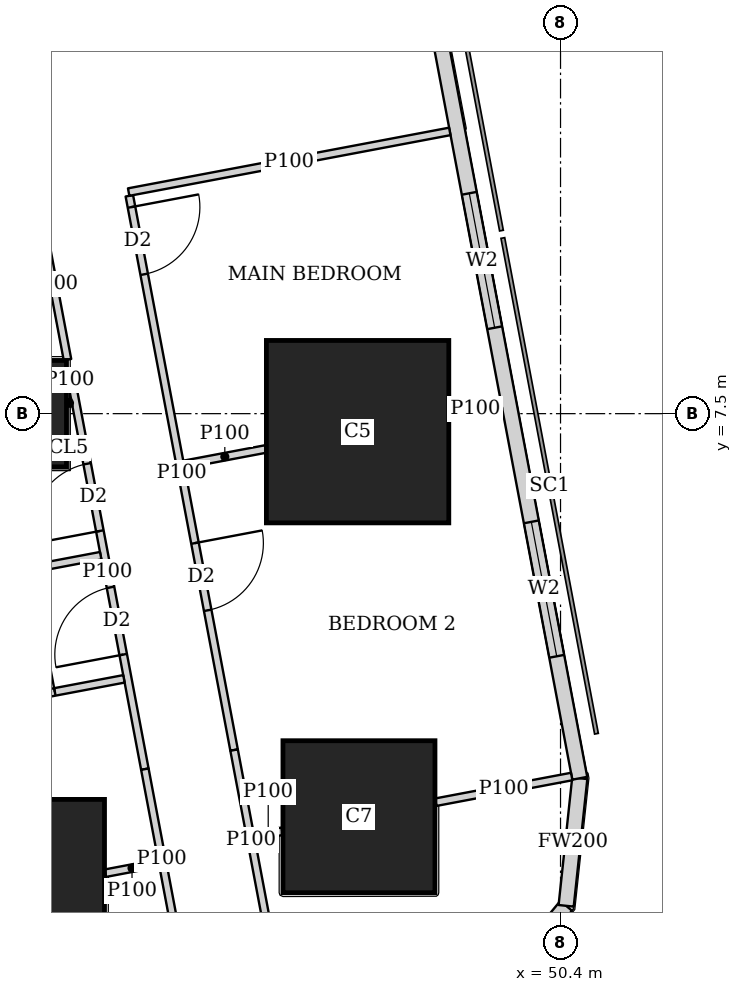
"""IFC4 building model, lengths in metres.
Left out: names, types, materials, properties, quantities, classifications, styles, units other than length and angle.
Written with IfcOpenShell. Run it as: python <this file> out.ifc"""

import sys

from ifc_helpers import new_model, si_unit, direction, frame, frame_2d, origin, origin_2d, place, context, subcontext, project, spatial, rectangle, extrude, element, fill, save


model = new_model("IFC4")
c1 = context("Model", 3, precision=1e-05, world=origin(), true_north=direction((0.0, 1.0)))
c2 = subcontext(c1, "Body", "Model", "MODEL_VIEW")
j1 = project(units=[si_unit("LENGTHUNIT", "METRE"), si_unit("PLANEANGLEUNIT", "RADIAN")], contexts=[c1])
p1 = place(None, origin())
s1 = spatial("IfcSite", under=j1, at=p1, CompositionType="ELEMENT")
p2 = place(p1, origin())
s2 = spatial("IfcBuilding", under=s1, at=p2, CompositionType="ELEMENT")
p3 = place(p2, frame((0.0, 0.0, 208.7)))
s3 = spatial("IfcBuildingStorey", under=s2, at=p3, CompositionType="ELEMENT", Elevation=208.7)
p4 = place(p3, frame((43.2, 1.225, 0.0), z_axis=(0.0, 0.0, 1.0), x_axis=(1.0, 0.0, 0.0)))
e1 = element("IfcColumn", 1, at=p4, inside=s3, PredefinedType="COLUMN", context=c2, shape_type="SweptSolid", body=[
    extrude(rectangle(XDim=2.4, YDim=2.4, at=origin_2d()), origin(), (0.0, 0.0, 1.0), 3.75),
])
p5 = place(p3, frame((47.748, 2.197, 0.0), z_axis=(0.0, 0.0, 1.0), x_axis=(1.0, 0.0, 0.0)))
e2 = element("IfcColumn", 2, at=p5, inside=s3, PredefinedType="COLUMN", context=c2, shape_type="SweptSolid", body=[
    extrude(rectangle(XDim=2.0, YDim=2.0, at=origin_2d()), origin(), (0.0, 0.0, 1.0), 3.75),
])
p6 = place(p3, frame((43.2, 7.5, 0.0), z_axis=(0.0, 0.0, 1.0), x_axis=(1.0, 0.0, 0.0)))
e3 = element("IfcColumn", 3, at=p6, inside=s3, PredefinedType="COLUMN", context=c2, shape_type="SweptSolid", body=[
    extrude(rectangle(XDim=1.4, YDim=1.4, at=origin_2d()), origin(), (0.0, 0.0, 1.0), 3.75),
])
p7 = place(p3, frame((47.73, 7.263, 0.0), z_axis=(0.0, 0.0, 1.0), x_axis=(1.0, 0.0, 0.0)))
e4 = element("IfcColumn", 4, at=p7, inside=s3, PredefinedType="COLUMN", context=c2, shape_type="SweptSolid", body=[
    extrude(rectangle(XDim=2.4, YDim=2.4, at=origin_2d()), origin(), (0.0, 0.0, 1.0), 3.75),
])
p8 = place(p3, frame((49.407, -0.263, 0.0), z_axis=(0.0, 0.0, 1.0), x_axis=(0.638042593423, 0.770001070764, 0.0)))
e5 = element("IfcWall", 5, at=p8, inside=s3, PredefinedType="SOLIDWALL", context=c2, shape_type="SweptSolid", body=[
    extrude(rectangle(XDim=1.673, YDim=0.2, at=frame_2d((0.836, 0.0))), origin(), (0.0, 0.0, 1.0), 3.5),
])
p9 = place(p3, frame((50.474, 1.025, 0.0), z_axis=(0.0, 0.0, 1.0), x_axis=(0.106047815515, 0.994361031429, 0.0)))
e6 = element("IfcWall", 6, at=p9, inside=s3, PredefinedType="SOLIDWALL", context=c2, shape_type="SweptSolid", body=[
    extrude(rectangle(XDim=1.688, YDim=0.2, at=frame_2d((0.844, 0.0))), origin(), (0.0, 0.0, 1.0), 3.5),
])
p10 = place(p3, frame((50.653, 2.703, 0.0), z_axis=(0.0, 0.0, 1.0), x_axis=(-0.185612026696, 0.982623109613, 0.0)))
e7 = element("IfcWall", 7, at=p10, inside=s3, PredefinedType="SOLIDWALL", context=c2, shape_type="SweptSolid", body=[
    extrude(rectangle(XDim=41.393, YDim=0.2, at=frame_2d((20.697, 0.0))), origin(), (0.0, 0.0, 1.0), 3.5),
])
p11 = place(p10, frame((1.633, 0.0, 0.9)))
e8 = element("IfcOpeningElement", 8, at=p11, cuts=e7, PredefinedType="OPENING", context=c2, shape_type="SweptSolid", body=[
    extrude(rectangle(XDim=1.8, YDim=1.5, at=frame_2d((0.9, 0.75))), frame((0.0, 0.11, 0.0), z_axis=(0.0, -1.0, 0.0), x_axis=(1.0, 0.0, 0.0)), (0.0, 0.0, 1.0), 0.22),
])
p12 = place(p10, frame((6.032, 0.0, 0.9)))
e9 = element("IfcOpeningElement", 9, at=p12, cuts=e7, PredefinedType="OPENING", context=c2, shape_type="SweptSolid", body=[
    extrude(rectangle(XDim=1.8, YDim=1.5, at=frame_2d((0.9, 0.75))), frame((0.0, 0.11, 0.0), z_axis=(0.0, -1.0, 0.0), x_axis=(1.0, 0.0, 0.0)), (0.0, 0.0, 1.0), 0.22),
])
p13 = place(p10, frame((9.848, 0.0, 0.9)))
e10 = element("IfcOpeningElement", 10, at=p13, cuts=e7, PredefinedType="OPENING", context=c2, shape_type="SweptSolid", body=[
    extrude(rectangle(XDim=1.8, YDim=1.5, at=frame_2d((0.9, 0.75))), frame((0.0, 0.11, 0.0), z_axis=(0.0, -1.0, 0.0), x_axis=(1.0, 0.0, 0.0)), (0.0, 0.0, 1.0), 0.22),
])
p14 = place(p10, frame((13.664, 0.0, 0.9)))
e11 = element("IfcOpeningElement", 11, at=p14, cuts=e7, PredefinedType="OPENING", context=c2, shape_type="SweptSolid", body=[
    extrude(rectangle(XDim=1.8, YDim=1.5, at=frame_2d((0.9, 0.75))), frame((0.0, 0.11, 0.0), z_axis=(0.0, -1.0, 0.0), x_axis=(1.0, 0.0, 0.0)), (0.0, 0.0, 1.0), 0.22),
])
p15 = place(p10, frame((17.481, 0.0, 0.9)))
e12 = element("IfcOpeningElement", 12, at=p15, cuts=e7, PredefinedType="OPENING", context=c2, shape_type="SweptSolid", body=[
    extrude(rectangle(XDim=1.8, YDim=1.5, at=frame_2d((0.9, 0.75))), frame((0.0, 0.11, 0.0), z_axis=(0.0, -1.0, 0.0), x_axis=(1.0, 0.0, 0.0)), (0.0, 0.0, 1.0), 0.22),
])
p16 = place(p10, frame((21.297, 0.0, 0.9)))
e13 = element("IfcOpeningElement", 13, at=p16, cuts=e7, PredefinedType="OPENING", context=c2, shape_type="SweptSolid", body=[
    extrude(rectangle(XDim=1.8, YDim=1.5, at=frame_2d((0.9, 0.75))), frame((0.0, 0.11, 0.0), z_axis=(0.0, -1.0, 0.0), x_axis=(1.0, 0.0, 0.0)), (0.0, 0.0, 1.0), 0.22),
])
p17 = place(p10, frame((25.113, 0.0, 0.9)))
e14 = element("IfcOpeningElement", 14, at=p17, cuts=e7, PredefinedType="OPENING", context=c2, shape_type="SweptSolid", body=[
    extrude(rectangle(XDim=1.8, YDim=1.5, at=frame_2d((0.9, 0.75))), frame((0.0, 0.11, 0.0), z_axis=(0.0, -1.0, 0.0), x_axis=(1.0, 0.0, 0.0)), (0.0, 0.0, 1.0), 0.22),
])
p18 = place(p10, frame((28.93, 0.0, 0.9)))
e15 = element("IfcOpeningElement", 15, at=p18, cuts=e7, PredefinedType="OPENING", context=c2, shape_type="SweptSolid", body=[
    extrude(rectangle(XDim=1.8, YDim=1.5, at=frame_2d((0.9, 0.75))), frame((0.0, 0.11, 0.0), z_axis=(0.0, -1.0, 0.0), x_axis=(1.0, 0.0, 0.0)), (0.0, 0.0, 1.0), 0.22),
])
p19 = place(p10, frame((32.746, 0.0, 0.9)))
e16 = element("IfcOpeningElement", 16, at=p19, cuts=e7, PredefinedType="OPENING", context=c2, shape_type="SweptSolid", body=[
    extrude(rectangle(XDim=1.8, YDim=1.5, at=frame_2d((0.9, 0.75))), frame((0.0, 0.11, 0.0), z_axis=(0.0, -1.0, 0.0), x_axis=(1.0, 0.0, 0.0)), (0.0, 0.0, 1.0), 0.22),
])
p20 = place(p10, frame((36.481, 0.0, 0.9)))
e17 = element("IfcOpeningElement", 17, at=p20, cuts=e7, PredefinedType="OPENING", context=c2, shape_type="SweptSolid", body=[
    extrude(rectangle(XDim=1.8, YDim=1.5, at=frame_2d((0.9, 0.75))), frame((0.0, 0.11, 0.0), z_axis=(0.0, -1.0, 0.0), x_axis=(1.0, 0.0, 0.0)), (0.0, 0.0, 1.0), 0.22),
])
p21 = place(p3, frame((44.727, 10.366, 0.0), z_axis=(0.0, 0.0, 1.0), x_axis=(0.185678775129, -0.982610498858, 0.0)))
e18 = element("IfcWall", 18, at=p21, inside=s3, PredefinedType="PARTITIONING", context=c2, shape_type="SweptSolid", body=[
    extrude(rectangle(XDim=7.421, YDim=0.1, at=frame_2d((3.71, 0.0))), origin(), (0.0, 0.0, 1.0), 3.5),
])
p22 = place(p21, frame((0.151, 0.0, 0.0)))
e19 = element("IfcOpeningElement", 19, at=p22, cuts=e18, PredefinedType="OPENING", context=c2, shape_type="SweptSolid", body=[
    extrude(rectangle(XDim=0.9, YDim=2.1, at=frame_2d((0.45, 1.05))), frame((0.0, 0.06, 0.0), z_axis=(0.0, -1.0, 0.0), x_axis=(1.0, 0.0, 0.0)), (0.0, 0.0, 1.0), 0.12),
])
p23 = place(p21, frame((4.65, 0.0, 0.0)))
e20 = element("IfcOpeningElement", 20, at=p23, cuts=e18, PredefinedType="OPENING", context=c2, shape_type="SweptSolid", body=[
    extrude(rectangle(XDim=0.9, YDim=2.1, at=frame_2d((0.45, 1.05))), frame((0.0, 0.06, 0.0), z_axis=(0.0, -1.0, 0.0), x_axis=(1.0, 0.0, 0.0)), (0.0, 0.0, 1.0), 0.12),
])
p24 = place(p3, frame((46.105, 3.074, 0.0), z_axis=(0.0, 0.0, 1.0), x_axis=(0.185631845838, -0.982619365681, 0.0)))
e21 = element("IfcWall", 21, at=p24, inside=s3, PredefinedType="PARTITIONING", context=c2, shape_type="SweptSolid", body=[
    extrude(rectangle(XDim=2.403, YDim=0.1, at=frame_2d((1.201, 0.0))), origin(), (0.0, 0.0, 1.0), 2.05),
])
p25 = place(p3, frame((43.539, 10.192, 0.0), z_axis=(0.0, 0.0, 1.0), x_axis=(0.185443145218, -0.982654995353, 0.0)))
e22 = element("IfcWall", 22, at=p25, inside=s3, PredefinedType="PARTITIONING", context=c2, shape_type="SweptSolid", body=[
    extrude(rectangle(XDim=2.017, YDim=0.1, at=frame_2d((1.008, 0.0))), origin(), (0.0, 0.0, 1.0), 3.5),
])
p26 = place(p3, frame((43.949, 8.02, 0.0), z_axis=(0.0, 0.0, 1.0), x_axis=(0.185656792073, -0.982614652627, 0.0)))
e23 = element("IfcWall", 23, at=p26, inside=s3, PredefinedType="PARTITIONING", context=c2, shape_type="SweptSolid", body=[
    extrude(rectangle(XDim=5.289, YDim=0.1, at=frame_2d((2.645, 0.0))), origin(), (0.0, 0.0, 1.0), 3.5),
])
p27 = place(p26, frame((1.2, 0.0, 0.0)))
e24 = element("IfcOpeningElement", 24, at=p27, cuts=e23, PredefinedType="OPENING", context=c2, shape_type="SweptSolid", body=[
    extrude(rectangle(XDim=0.9, YDim=2.1, at=frame_2d((0.45, 1.05))), frame((0.0, 0.06, 0.0), z_axis=(0.0, -1.0, 0.0), x_axis=(1.0, 0.0, 0.0)), (0.0, 0.0, 1.0), 0.12),
])
p28 = place(p26, frame((2.855, 0.0, 0.0)))
e25 = element("IfcOpeningElement", 25, at=p28, cuts=e23, PredefinedType="OPENING", context=c2, shape_type="SweptSolid", body=[
    extrude(rectangle(XDim=0.9, YDim=2.1, at=frame_2d((0.45, 1.05))), frame((0.0, 0.06, 0.0), z_axis=(0.0, -1.0, 0.0), x_axis=(1.0, 0.0, 0.0)), (0.0, 0.0, 1.0), 0.12),
])
p29 = place(p3, frame((44.931, 2.823, 0.0), z_axis=(0.0, 0.0, 1.0), x_axis=(0.185631845838, -0.982619365681, 0.0)))
e26 = element("IfcWall", 26, at=p29, inside=s3, PredefinedType="PARTITIONING", context=c2, shape_type="SweptSolid", body=[
    extrude(rectangle(XDim=2.403, YDim=0.1, at=frame_2d((1.201, 0.0))), origin(), (0.0, 0.0, 1.0), 2.05),
])
p30 = place(p3, frame((48.943, 11.213, 0.0), z_axis=(0.0, 0.0, 1.0), x_axis=(-0.982633535512, -0.185556823879, 0.0)))
e27 = element("IfcWall", 27, at=p30, inside=s3, PredefinedType="PARTITIONING", context=c2, shape_type="SweptSolid", body=[
    extrude(rectangle(XDim=4.3, YDim=0.1, at=frame_2d((2.15, 0.0))), origin(), (0.0, 0.0, 1.0), 2.05),
])
p31 = place(p3, frame((49.622, 7.62, 0.0), z_axis=(0.0, 0.0, 1.0), x_axis=(-0.98254419619, -0.186029305578, 0.0)))
e28 = element("IfcWall", 28, at=p31, inside=s3, PredefinedType="PARTITIONING", context=c2, shape_type="SweptSolid", body=[
    extrude(rectangle(XDim=0.694, YDim=0.1, at=frame_2d((0.347, 0.0))), origin(), (0.0, 0.0, 1.0), 3.5),
])
p32 = place(p3, frame((46.52, 7.035, 0.0), z_axis=(0.0, 0.0, 1.0), x_axis=(-0.982620932907, -0.185623549726, 0.0)))
e29 = element("IfcWall", 29, at=p32, inside=s3, PredefinedType="PARTITIONING", context=c2, shape_type="SweptSolid", body=[
    extrude(rectangle(XDim=1.093, YDim=0.1, at=frame_2d((0.546, 0.0))), origin(), (0.0, 0.0, 1.0), 3.5),
])
p33 = place(p3, frame((50.547, 2.726, 0.0), z_axis=(0.0, 0.0, 1.0), x_axis=(-0.982603988143, -0.185713226471, 0.0)))
e30 = element("IfcWall", 30, at=p33, inside=s3, PredefinedType="PARTITIONING", context=c2, shape_type="SweptSolid", body=[
    extrude(rectangle(XDim=1.821, YDim=0.1, at=frame_2d((0.91, 0.0))), origin(), (0.0, 0.0, 1.0), 2.05),
])
p34 = place(p3, frame((46.738, 2.006, 0.0), z_axis=(0.0, 0.0, 1.0), x_axis=(-0.982820466874, -0.184564161994, 0.0)))
e31 = element("IfcWall", 31, at=p34, inside=s3, PredefinedType="PARTITIONING", context=c2, shape_type="SweptSolid", body=[
    extrude(rectangle(XDim=0.374, YDim=0.1, at=frame_2d((0.187, 0.0))), origin(), (0.0, 0.0, 1.0), 2.05),
])
p35 = place(p3, frame((43.969, 7.646, 0.0), z_axis=(0.0, 0.0, 1.0), x_axis=(-0.983147034646, -0.182816597351, 0.0)))
e32 = element("IfcWall", 32, at=p35, inside=s3, PredefinedType="PARTITIONING", context=c2, shape_type="SweptSolid", body=[
    extrude(rectangle(XDim=0.06, YDim=0.1, at=frame_2d((0.03, 0.0))), origin(), (0.0, 0.0, 1.0), 3.5),
])
p36 = place(p3, frame((45.114, 1.587, 0.0), z_axis=(0.0, 0.0, 1.0), x_axis=(-0.982671022916, -0.185358195723, 0.0)))
e33 = element("IfcWall", 33, at=p36, inside=s3, PredefinedType="PARTITIONING", context=c2, shape_type="SweptSolid", body=[
    extrude(rectangle(XDim=0.717, YDim=0.1, at=frame_2d((0.358, 0.0))), origin(), (0.0, 0.0, 1.0), 2.05),
])
p37 = place(p3, frame((44.35, 5.631, 0.0), z_axis=(0.0, 0.0, 1.0), x_axis=(-0.982638553676, -0.185530247748, 0.0)))
e34 = element("IfcWall", 34, at=p37, inside=s3, PredefinedType="PARTITIONING", context=c2, shape_type="SweptSolid", body=[
    extrude(rectangle(XDim=3.525, YDim=0.1, at=frame_2d((1.763, 0.0))), origin(), (0.0, 0.0, 1.0), 3.5),
])
p38 = place(p3, frame((41.192, 3.356, 0.0), z_axis=(0.0, 0.0, 1.0), x_axis=(0.982588017646, 0.185797706064, 0.0)))
e35 = element("IfcWall", 35, at=p38, inside=s3, PredefinedType="PARTITIONING", context=c2, shape_type="SweptSolid", body=[
    extrude(rectangle(XDim=3.525, YDim=0.1, at=frame_2d((1.763, 0.0))), origin(), (0.0, 0.0, 1.0), 3.5),
])
p39 = place(p38, frame((1.7, 0.0, 0.0)))
e36 = element("IfcOpeningElement", 36, at=p39, cuts=e35, PredefinedType="OPENING", context=c2, shape_type="SweptSolid", body=[
    extrude(rectangle(XDim=0.9, YDim=2.1, at=frame_2d((0.45, 1.05))), frame((0.0, 0.06, 0.0), z_axis=(0.0, -1.0, 0.0), x_axis=(1.0, 0.0, 0.0)), (0.0, 0.0, 1.0), 0.12),
])
p40 = place(p11, origin())
e37 = element("IfcWindow", 37, at=p40, inside=s3, PartitioningType="SINGLE_PANEL", PredefinedType="WINDOW", context=c2, shape_type="SweptSolid", body=[
    extrude(rectangle(XDim=1.8, YDim=1.5, at=frame_2d((0.9, 0.75))), frame((0.0, 0.03, 0.0), z_axis=(0.0, -1.0, 0.0), x_axis=(1.0, 0.0, 0.0)), (0.0, 0.0, 1.0), 0.06),
])
fill(e8, e37)
p41 = place(p12, origin())
e38 = element("IfcWindow", 38, at=p41, inside=s3, PartitioningType="SINGLE_PANEL", PredefinedType="WINDOW", context=c2, shape_type="SweptSolid", body=[
    extrude(rectangle(XDim=1.8, YDim=1.5, at=frame_2d((0.9, 0.75))), frame((0.0, 0.03, 0.0), z_axis=(0.0, -1.0, 0.0), x_axis=(1.0, 0.0, 0.0)), (0.0, 0.0, 1.0), 0.06),
])
fill(e9, e38)
p42 = place(p22, origin())
e39 = element("IfcDoor", 39, at=p42, inside=s3, OperationType="SINGLE_SWING_LEFT", PredefinedType="DOOR", context=c2, shape_type="SweptSolid", body=[
    extrude(rectangle(XDim=0.9, YDim=2.1, at=frame_2d((0.45, 1.05))), frame((0.0, 0.025, 0.0), z_axis=(0.0, -1.0, 0.0), x_axis=(1.0, 0.0, 0.0)), (0.0, 0.0, 1.0), 0.05),
])
fill(e19, e39)
p43 = place(p23, origin())
e40 = element("IfcDoor", 40, at=p43, inside=s3, OperationType="SINGLE_SWING_LEFT", PredefinedType="DOOR", context=c2, shape_type="SweptSolid", body=[
    extrude(rectangle(XDim=0.9, YDim=2.1, at=frame_2d((0.45, 1.05))), frame((0.0, 0.025, 0.0), z_axis=(0.0, -1.0, 0.0), x_axis=(1.0, 0.0, 0.0)), (0.0, 0.0, 1.0), 0.05),
])
fill(e20, e40)
p44 = place(p27, origin())
e41 = element("IfcDoor", 41, at=p44, inside=s3, OperationType="SINGLE_SWING_LEFT", PredefinedType="DOOR", context=c2, shape_type="SweptSolid", body=[
    extrude(rectangle(XDim=0.9, YDim=2.1, at=frame_2d((0.45, 1.05))), frame((0.0, 0.025, 0.0), z_axis=(0.0, -1.0, 0.0), x_axis=(1.0, 0.0, 0.0)), (0.0, 0.0, 1.0), 0.05),
])
fill(e24, e41)
p45 = place(p28, origin())
e42 = element("IfcDoor", 42, at=p45, inside=s3, OperationType="SINGLE_SWING_LEFT", PredefinedType="DOOR", context=c2, shape_type="SweptSolid", body=[
    extrude(rectangle(XDim=0.9, YDim=2.1, at=frame_2d((0.45, 1.05))), frame((0.0, 0.025, 0.0), z_axis=(0.0, -1.0, 0.0), x_axis=(1.0, 0.0, 0.0)), (0.0, 0.0, 1.0), 0.05),
])
fill(e25, e42)
p46 = place(p39, origin())
e43 = element("IfcDoor", 43, at=p46, inside=s3, OperationType="SINGLE_SWING_RIGHT", PredefinedType="DOOR", context=c2, shape_type="SweptSolid", body=[
    extrude(rectangle(XDim=0.9, YDim=2.1, at=frame_2d((0.45, 1.05))), frame((0.0, 0.025, 0.0), z_axis=(0.0, -1.0, 0.0), x_axis=(1.0, 0.0, 0.0)), (0.0, 0.0, 1.0), 0.05),
])
fill(e36, e43)
save(model, sys.argv[1])
